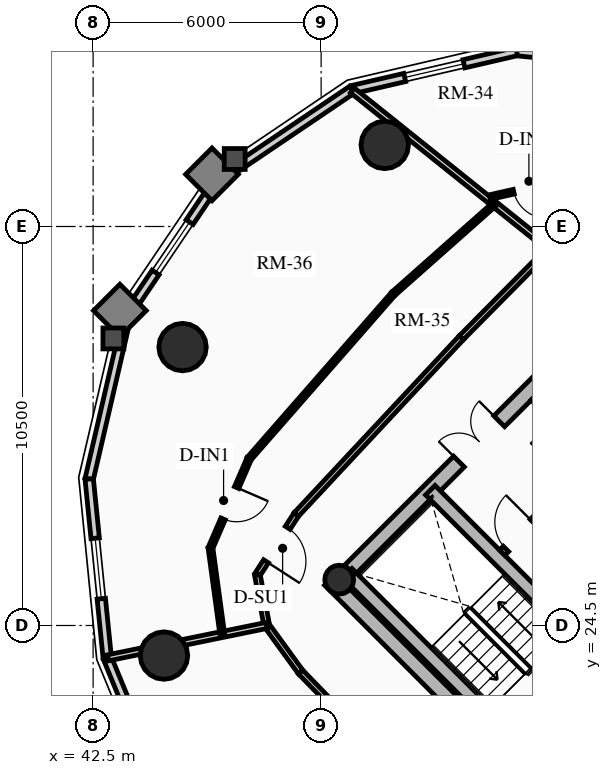
"""IFC4 building model, lengths in metres.
Left out: names, types, materials, properties, quantities, classifications, styles, units other than length and angle.
Written with IfcOpenShell. Run it as: python <this file> out.ifc"""

import sys

from ifc_helpers import new_model, si_unit, direction, frame, frame_2d, origin, origin_2d, place, context, subcontext, project, spatial, rectangle, circle, hollow_circle, extrude, source, transform, mapped, element, fill, save


model = new_model("IFC4")
c1 = context("Model", 3, precision=1e-05, world=origin(), true_north=direction((0.0, 1.0)))
c2 = subcontext(c1, "Body", "Model", "MODEL_VIEW")
j1 = project(units=[si_unit("LENGTHUNIT", "METRE"), si_unit("PLANEANGLEUNIT", "RADIAN")], contexts=[c1])
p1 = place(None, origin())
s1 = spatial("IfcSite", under=j1, at=p1, CompositionType="ELEMENT")
p2 = place(p1, origin())
s2 = spatial("IfcBuilding", under=s1, at=p2, CompositionType="ELEMENT")
p3 = place(p2, frame((0.0, 0.0, 169.06)))
s3 = spatial("IfcBuildingStorey", under=s2, at=p3, CompositionType="ELEMENT", Elevation=169.06)
p4 = place(p3, frame((58.702, 15.732, 0.0), z_axis=(0.0, 0.0, 1.0), x_axis=(-0.707106781187, 0.707106781187, 0.0)))
e1 = element("IfcWall", 1, at=p4, inside=s3, PredefinedType="SHEAR", context=c2, shape_type="SweptSolid", body=[
    extrude(rectangle(XDim=14.1, YDim=0.4, at=frame_2d((7.05, 0.0))), origin(), (0.0, 0.0, 1.0), 2.91),
])
p5 = place(p3, frame((48.873, 25.561, 0.0), z_axis=(0.0, 0.0, 1.0), x_axis=(0.707106781187, 0.707106781187, 0.0)))
e2 = element("IfcWall", 2, at=p5, inside=s3, PredefinedType="SHEAR", context=c2, shape_type="SweptSolid", body=[
    extrude(rectangle(XDim=10.7, YDim=0.4, at=frame_2d((5.35, 0.0))), origin(), (0.0, 0.0, 1.0), 2.91),
])
m1 = source(origin(), c2, "Body", "SweptSolid", [
    extrude(rectangle(XDim=1.5, YDim=2.02, at=frame_2d((0.75, 1.01))), frame((0.0, 0.21, 0.0), z_axis=(0.0, -1.0, 0.0), x_axis=(1.0, 0.0, 0.0)), (0.0, 0.0, 1.0), 0.42),
])
p6 = place(p5, frame((4.6, 0.0, 0.0)))
e3 = element("IfcOpeningElement", 3, at=p6, cuts=e2, PredefinedType="OPENING", context=c2, shape_type="MappedRepresentation", body=[
    mapped(m1, transform((0.0, 0.0, 0.0), x_axis=(1.0, 0.0, 0.0), y_axis=(0.0, 1.0, 0.0), z_axis=(0.0, 0.0, 1.0), scale=1.0)),
])
p7 = place(p3, frame((61.06, 18.373, 0.0), z_axis=(0.0, 0.0, 1.0), x_axis=(-0.707106781187, 0.707106781187, 0.0)))
e4 = element("IfcWall", 4, at=p7, inside=s3, PredefinedType="SHEAR", context=c2, shape_type="SweptSolid", body=[
    extrude(rectangle(XDim=13.7, YDim=0.35, at=frame_2d((6.85, 0.0))), origin(), (0.0, 0.0, 1.0), 2.91),
])
m2 = source(origin(), c2, "Body", "SweptSolid", [
    extrude(rectangle(XDim=1.1, YDim=2.015, at=frame_2d((0.55, 1.007))), frame((0.0, 0.185, 0.0), z_axis=(0.0, -1.0, 0.0), x_axis=(1.0, 0.0, 0.0)), (0.0, 0.0, 1.0), 0.37),
])
p8 = place(p7, frame((4.85, 0.0, 0.0)))
e5 = element("IfcOpeningElement", 5, at=p8, cuts=e4, PredefinedType="OPENING", context=c2, shape_type="MappedRepresentation", body=[
    mapped(m2, transform((0.0, 0.0, 0.0), x_axis=(1.0, 0.0, 0.0), y_axis=(0.0, 1.0, 0.0), z_axis=(0.0, 0.0, 1.0), scale=1.0)),
])
p9 = place(p7, frame((0.625, 0.0, 0.0)))
e6 = element("IfcOpeningElement", 6, at=p9, cuts=e4, PredefinedType="OPENING", context=c2, shape_type="MappedRepresentation", body=[
    mapped(m2, transform((0.0, 0.0, 0.0), x_axis=(1.0, 0.0, 0.0), y_axis=(0.0, 1.0, 0.0), z_axis=(0.0, 0.0, 1.0), scale=1.0)),
])
p10 = place(p7, frame((2.625, 0.0, 0.0)))
e7 = element("IfcOpeningElement", 7, at=p10, cuts=e4, PredefinedType="OPENING", context=c2, shape_type="MappedRepresentation", body=[
    mapped(m2, transform((0.0, 0.0, 0.0), x_axis=(1.0, 0.0, 0.0), y_axis=(0.0, 1.0, 0.0), z_axis=(0.0, 0.0, 1.0), scale=1.0)),
])
m3 = source(origin(), c2, "Body", "SweptSolid", [
    extrude(rectangle(XDim=1.15, YDim=2.02, at=frame_2d((0.575, 1.01))), frame((0.0, 0.185, 0.0), z_axis=(0.0, -1.0, 0.0), x_axis=(1.0, 0.0, 0.0)), (0.0, 0.0, 1.0), 0.37),
])
p11 = place(p7, frame((7.27, 0.0, 0.0)))
e8 = element("IfcOpeningElement", 8, at=p11, cuts=e4, PredefinedType="OPENING", context=c2, shape_type="MappedRepresentation", body=[
    mapped(m3, transform((0.0, 0.0, 0.0), x_axis=(1.0, 0.0, 0.0), y_axis=(0.0, 1.0, 0.0), z_axis=(0.0, 0.0, 1.0), scale=1.0)),
])
p12 = place(p3, frame((53.922, 21.141, 0.0), z_axis=(0.0, 0.0, 1.0), x_axis=(-0.707106781187, 0.707106781187, 0.0)))
e9 = element("IfcWall", 9, at=p12, inside=s3, PredefinedType="SHEAR", context=c2, shape_type="SweptSolid", body=[
    extrude(rectangle(XDim=6.695, YDim=0.35, at=frame_2d((3.348, 0.0))), origin(), (0.0, 0.0, 1.0), 2.91),
])
p13 = place(p3, frame((53.784, 21.003, 0.0), z_axis=(0.0, 0.0, 1.0), x_axis=(0.707106781187, 0.707106781187, 0.0)))
e10 = element("IfcWall", 10, at=p13, inside=s3, PredefinedType="SHEAR", context=c2, shape_type="SweptSolid", body=[
    extrude(rectangle(XDim=3.285, YDim=0.35, at=frame_2d((1.643, 0.0))), origin(), (0.0, 0.0, 1.0), 2.91),
])
p14 = place(p3, frame((48.976, 25.706, 0.0), z_axis=(0.0, 0.0, 1.0), x_axis=(0.707106781187, 0.707106781187, 0.0)))
e11 = element("IfcColumn", 11, at=p14, inside=s3, PredefinedType="COLUMN", context=c2, shape_type="SweptSolid", body=[
    extrude(hollow_circle(Radius=0.38, WallThickness=0.032, at=origin_2d()), origin(), (0.0, 0.0, 1.0), 2.91),
])
for number, where, z_axis, x_axis in (
    (12, (50.173, 37.146, 0.0), (0.0, 0.0, 1.0), (1.0, 0.0, 0.0)),
    (13, (44.854, 31.827, 0.0), (0.0, 0.0, 1.0), (1.0, 0.0, 0.0)),
    (14, (44.365, 23.709, 0.0), (0.0, 0.0, 1.0), (1.0, 0.0, 0.0)),
):
    element("IfcColumn", number, at=place(p3, frame(where, z_axis=z_axis, x_axis=x_axis)), inside=s3, PredefinedType="USERDEFINED", context=c2, shape_type="SweptSolid", body=[
        extrude(circle(Radius=0.625, at=origin_2d()), origin(), (0.0, 0.0, 1.0), 2.91),
    ])
p15 = place(p3, frame((53.645, 39.603, 0.0), z_axis=(0.0, 0.0, 1.0), x_axis=(0.994943283129, -0.100438356004, 0.0)))
e15 = element("IfcWall", 15, at=p15, inside=s3, PredefinedType="SOLIDWALL", context=c2, shape_type="SweptSolid", body=[
    extrude(rectangle(XDim=4.733, YDim=0.22, at=frame_2d((2.366, 0.0))), origin(), (0.0, 0.0, 1.0), 2.245),
])
m4 = source(origin(), c2, "Body", "SweptSolid", [
    extrude(rectangle(XDim=1.15, YDim=2.005, at=frame_2d((0.575, 1.002))), frame((0.0, 0.12, 0.0), z_axis=(0.0, -1.0, 0.0), x_axis=(1.0, 0.0, 0.0)), (0.0, 0.0, 1.0), 0.24),
])
p16 = place(p15, frame((1.791, 0.0, 0.0)))
e16 = element("IfcOpeningElement", 16, at=p16, cuts=e15, PredefinedType="OPENING", context=c2, shape_type="MappedRepresentation", body=[
    mapped(m4, transform((0.0, 0.0, 0.0), x_axis=(1.0, 0.0, 0.0), y_axis=(0.0, 1.0, 0.0), z_axis=(0.0, 0.0, 1.0), scale=1.0)),
])
p17 = place(p3, frame((49.313, 38.6, 0.0), z_axis=(0.0, 0.0, 1.0), x_axis=(0.97422620202, 0.22557328587, 0.0)))
e17 = element("IfcWall", 17, at=p17, inside=s3, PredefinedType="SOLIDWALL", context=c2, shape_type="SweptSolid", body=[
    extrude(rectangle(XDim=4.446, YDim=0.22, at=frame_2d((2.223, 0.0))), origin(), (0.0, 0.0, 1.0), 2.245),
])
m5 = source(origin(), c2, "Body", "SweptSolid", [
    extrude(rectangle(XDim=1.6, YDim=1.3, at=frame_2d((0.8, 0.65))), frame((0.0, 0.12, 0.0), z_axis=(0.0, -1.0, 0.0), x_axis=(1.0, 0.0, 0.0)), (0.0, 0.0, 1.0), 0.24),
])
p18 = place(p17, frame((1.423, 0.0, 0.65)))
e18 = element("IfcOpeningElement", 18, at=p18, cuts=e17, PredefinedType="OPENING", context=c2, shape_type="MappedRepresentation", body=[
    mapped(m5, transform((0.0, 0.0, 0.0), x_axis=(1.0, 0.0, 0.0), y_axis=(0.0, 1.0, 0.0), z_axis=(0.0, 0.0, 1.0), scale=1.0)),
])
p19 = place(p3, frame((45.783, 36.217, 0.0), z_axis=(0.0, 0.0, 1.0), x_axis=(0.828817439852, 0.55951912514, 0.0)))
e19 = element("IfcWall", 19, at=p19, inside=s3, PredefinedType="SOLIDWALL", context=c2, shape_type="SweptSolid", body=[
    extrude(rectangle(XDim=4.259, YDim=0.22, at=frame_2d((2.129, 0.0))), origin(), (0.0, 0.0, 1.0), 2.245),
])
p20 = place(p3, frame((43.4, 32.687, 0.0), z_axis=(0.0, 0.0, 1.0), x_axis=(0.55951912514, 0.828817439852, 0.0)))
e20 = element("IfcWall", 20, at=p20, inside=s3, PredefinedType="SOLIDWALL", context=c2, shape_type="SweptSolid", body=[
    extrude(rectangle(XDim=4.259, YDim=0.22, at=frame_2d((2.129, 0.0))), origin(), (0.0, 0.0, 1.0), 2.245),
])
p21 = place(p20, frame((1.33, 0.0, 0.65)))
e21 = element("IfcOpeningElement", 21, at=p21, cuts=e20, PredefinedType="OPENING", context=c2, shape_type="MappedRepresentation", body=[
    mapped(m5, transform((0.0, 0.0, 0.0), x_axis=(1.0, 0.0, 0.0), y_axis=(0.0, 1.0, 0.0), z_axis=(0.0, 0.0, 1.0), scale=1.0)),
])
p22 = place(p3, frame((42.397, 28.355, 0.0), z_axis=(0.0, 0.0, 1.0), x_axis=(0.22557328587, 0.97422620202, 0.0)))
e22 = element("IfcWall", 22, at=p22, inside=s3, PredefinedType="SOLIDWALL", context=c2, shape_type="SweptSolid", body=[
    extrude(rectangle(XDim=4.446, YDim=0.22, at=frame_2d((2.223, 0.0))), origin(), (0.0, 0.0, 1.0), 2.245),
])
p23 = place(p3, frame((42.873, 23.646, 0.0), z_axis=(0.0, 0.0, 1.0), x_axis=(-0.100438356004, 0.994943283129, 0.0)))
e23 = element("IfcWall", 23, at=p23, inside=s3, PredefinedType="SOLIDWALL", context=c2, shape_type="SweptSolid", body=[
    extrude(rectangle(XDim=4.733, YDim=0.22, at=frame_2d((2.366, 0.0))), origin(), (0.0, 0.0, 1.0), 2.245),
])
p24 = place(p23, frame((1.566, 0.0, 0.65)))
e24 = element("IfcOpeningElement", 24, at=p24, cuts=e23, PredefinedType="OPENING", context=c2, shape_type="MappedRepresentation", body=[
    mapped(m5, transform((0.0, 0.0, 0.0), x_axis=(1.0, 0.0, 0.0), y_axis=(0.0, 1.0, 0.0), z_axis=(0.0, 0.0, 1.0), scale=1.0)),
])
p25 = place(p3, frame((44.78, 19.021, 0.0), z_axis=(0.0, 0.0, 1.0), x_axis=(-0.381196434348, 0.924494066201, 0.0)))
e25 = element("IfcWall", 25, at=p25, inside=s3, PredefinedType="SOLIDWALL", context=c2, shape_type="SweptSolid", body=[
    extrude(rectangle(XDim=5.003, YDim=0.22, at=frame_2d((2.501, 0.0))), origin(), (0.0, 0.0, 1.0), 2.245),
])
p26 = place(p25, frame((1.702, 0.0, 0.65)))
e26 = element("IfcOpeningElement", 26, at=p26, cuts=e25, PredefinedType="OPENING", context=c2, shape_type="MappedRepresentation", body=[
    mapped(m5, transform((0.0, 0.0, 0.0), x_axis=(1.0, 0.0, 0.0), y_axis=(0.0, 1.0, 0.0), z_axis=(0.0, 0.0, 1.0), scale=1.0)),
])
p27 = place(p3, frame((53.264, 26.416, 0.0), z_axis=(0.0, 0.0, 1.0), x_axis=(0.707106781187, 0.707106781187, 0.0)))
e27 = element("IfcWall", 27, at=p27, inside=s3, PredefinedType="PARTITIONING", context=c2, shape_type="SweptSolid", body=[
    extrude(rectangle(XDim=3.28, YDim=0.2, at=frame_2d((1.64, 0.0))), origin(), (0.0, 0.0, 1.0), 2.675),
])
m6 = source(origin(), c2, "Body", "SweptSolid", [
    extrude(rectangle(XDim=1.0, YDim=2.015, at=frame_2d((0.5, 1.007))), frame((0.0, 0.11, 0.0), z_axis=(0.0, -1.0, 0.0), x_axis=(1.0, 0.0, 0.0)), (0.0, 0.0, 1.0), 0.22),
])
p28 = place(p27, frame((0.14, 0.0, 0.0)))
e28 = element("IfcOpeningElement", 28, at=p28, cuts=e27, PredefinedType="OPENING", context=c2, shape_type="MappedRepresentation", body=[
    mapped(m6, transform((0.0, 0.0, 0.0), x_axis=(1.0, 0.0, 0.0), y_axis=(0.0, 1.0, 0.0), z_axis=(0.0, 0.0, 1.0), scale=1.0)),
])
m7 = source(origin(), c2, "Body", "SweptSolid", [
    extrude(rectangle(XDim=0.9, YDim=2.005, at=frame_2d((0.45, 1.002))), frame((0.0, 0.11, 0.0), z_axis=(0.0, -1.0, 0.0), x_axis=(1.0, 0.0, 0.0)), (0.0, 0.0, 1.0), 0.22),
])
p29 = place(p27, frame((2.05, 0.0, 0.0)))
e29 = element("IfcOpeningElement", 29, at=p29, cuts=e27, PredefinedType="OPENING", context=c2, shape_type="MappedRepresentation", body=[
    mapped(m7, transform((0.0, 0.0, 0.0), x_axis=(1.0, 0.0, 0.0), y_axis=(0.0, 1.0, 0.0), z_axis=(0.0, 0.0, 1.0), scale=1.0)),
])
p30 = place(p3, frame((56.839, 27.728, 0.0), z_axis=(0.0, 0.0, 1.0), x_axis=(-0.707106781187, 0.707106781187, 0.0)))
e30 = element("IfcWall", 30, at=p30, inside=s3, PredefinedType="PARTITIONING", context=c2, shape_type="SweptSolid", body=[
    extrude(rectangle(XDim=3.9, YDim=0.16, at=frame_2d((1.95, 0.0))), origin(), (0.0, 0.0, 1.0), 2.675),
])
m8 = source(origin(), c2, "Body", "SweptSolid", [
    extrude(rectangle(XDim=0.9, YDim=2.005, at=frame_2d((0.45, 1.002))), frame((0.0, 0.09, 0.0), z_axis=(0.0, -1.0, 0.0), x_axis=(1.0, 0.0, 0.0)), (0.0, 0.0, 1.0), 0.18),
])
p31 = place(p30, frame((2.2, 0.0, 0.0)))
e31 = element("IfcOpeningElement", 31, at=p31, cuts=e30, PredefinedType="OPENING", context=c2, shape_type="MappedRepresentation", body=[
    mapped(m8, transform((0.0, 0.0, 0.0), x_axis=(1.0, 0.0, 0.0), y_axis=(0.0, 1.0, 0.0), z_axis=(0.0, 0.0, 1.0), scale=1.0)),
])
p32 = place(p3, frame((54.514, 34.422, 0.0), z_axis=(0.0, 0.0, 1.0), x_axis=(-0.703289573518, -0.710903492593, 0.0)))
e32 = element("IfcWall", 32, at=p32, inside=s3, PredefinedType="PARTITIONING", context=c2, shape_type="SweptSolid", body=[
    extrude(rectangle(XDim=3.303, YDim=0.15, at=frame_2d((1.651, 0.0))), origin(), (0.0, 0.0, 1.0), 2.245),
])
p33 = place(p3, frame((52.191, 32.074, 0.0), z_axis=(0.0, 0.0, 1.0), x_axis=(-0.682404362608, -0.730974887321, 0.0)))
e33 = element("IfcWall", 33, at=p33, inside=s3, PredefinedType="PARTITIONING", context=c2, shape_type="SweptSolid", body=[
    extrude(rectangle(XDim=6.364, YDim=0.15, at=frame_2d((3.182, 0.0))), origin(), (0.0, 0.0, 1.0), 2.245),
])
p34 = place(p3, frame((47.849, 27.423, 0.0), z_axis=(0.0, 0.0, 1.0), x_axis=(-0.543529808582, -0.839389866023, 0.0)))
e34 = element("IfcWall", 34, at=p34, inside=s3, PredefinedType="PARTITIONING", context=c2, shape_type="SweptSolid", body=[
    extrude(rectangle(XDim=1.89, YDim=0.15, at=frame_2d((0.945, 0.0))), origin(), (0.0, 0.0, 1.0), 2.245),
])
m9 = source(origin(), c2, "Body", "SweptSolid", [
    extrude(rectangle(XDim=1.05, YDim=2.015, at=frame_2d((0.525, 1.007))), frame((0.0, 0.085, 0.0), z_axis=(0.0, -1.0, 0.0), x_axis=(1.0, 0.0, 0.0)), (0.0, 0.0, 1.0), 0.17),
])
p35 = place(p34, frame((0.42, 0.0, 0.0)))
e35 = element("IfcOpeningElement", 35, at=p35, cuts=e34, PredefinedType="OPENING", context=c2, shape_type="MappedRepresentation", body=[
    mapped(m9, transform((0.0, 0.0, 0.0), x_axis=(1.0, 0.0, 0.0), y_axis=(0.0, 1.0, 0.0), z_axis=(0.0, 0.0, 1.0), scale=1.0)),
])
p36 = place(p3, frame((46.822, 25.836, 0.0), z_axis=(0.0, 0.0, 1.0), x_axis=(0.182115036249, -0.983277231289, 0.0)))
e36 = element("IfcWall", 36, at=p36, inside=s3, PredefinedType="PARTITIONING", context=c2, shape_type="SweptSolid", body=[
    extrude(rectangle(XDim=1.357, YDim=0.15, at=frame_2d((0.678, 0.0))), origin(), (0.0, 0.0, 1.0), 2.245),
])
p37 = place(p3, frame((47.069, 24.502, 0.0), z_axis=(0.0, 0.0, 1.0), x_axis=(0.587577436866, -0.809167940347, 0.0)))
e37 = element("IfcWall", 37, at=p37, inside=s3, PredefinedType="PARTITIONING", context=c2, shape_type="SweptSolid", body=[
    extrude(rectangle(XDim=1.515, YDim=0.15, at=frame_2d((0.757, 0.0))), origin(), (0.0, 0.0, 1.0), 2.245),
])
p38 = place(p3, frame((47.959, 23.277, 0.0), z_axis=(0.0, 0.0, 1.0), x_axis=(0.696422573496, -0.717631938479, 0.0)))
e38 = element("IfcWall", 38, at=p38, inside=s3, PredefinedType="PARTITIONING", context=c2, shape_type="SweptSolid", body=[
    extrude(rectangle(XDim=5.882, YDim=0.15, at=frame_2d((2.941, 0.0))), origin(), (0.0, 0.0, 1.0), 2.675),
])
m10 = source(origin(), c2, "Body", "SweptSolid", [
    extrude(rectangle(XDim=1.0, YDim=2.015, at=frame_2d((0.5, 1.007))), frame((0.0, 0.085, 0.0), z_axis=(0.0, -1.0, 0.0), x_axis=(1.0, 0.0, 0.0)), (0.0, 0.0, 1.0), 0.17),
])
p39 = place(p38, frame((2.441, 0.0, 0.0)))
e39 = element("IfcOpeningElement", 39, at=p39, cuts=e38, PredefinedType="OPENING", context=c2, shape_type="MappedRepresentation", body=[
    mapped(m10, transform((0.0, 0.0, 0.0), x_axis=(1.0, 0.0, 0.0), y_axis=(0.0, 1.0, 0.0), z_axis=(0.0, 0.0, 1.0), scale=1.0)),
])
p40 = place(p3, frame((54.514, 34.422, 0.0), z_axis=(0.0, 0.0, 1.0), x_axis=(-0.780385234796, 0.625299036712, 0.0)))
e40 = element("IfcWall", 40, at=p40, inside=s3, PredefinedType="PARTITIONING", context=c2, shape_type="SweptSolid", body=[
    extrude(rectangle(XDim=6.653, YDim=0.16, at=frame_2d((3.326, 0.0))), origin(), (0.0, 0.0, 1.0), 2.245),
])
p41 = place(p3, frame((47.069, 24.502, 0.0), z_axis=(0.0, 0.0, 1.0), x_axis=(-0.979772902724, -0.200112616012, 0.0)))
e41 = element("IfcWall", 41, at=p41, inside=s3, PredefinedType="PARTITIONING", context=c2, shape_type="SweptSolid", body=[
    extrude(rectangle(XDim=4.263, YDim=0.16, at=frame_2d((2.131, 0.0))), origin(), (0.0, 0.0, 1.0), 2.245),
])
p42 = place(p3, frame((54.871, 36.211, 0.0), z_axis=(0.0, 0.0, 1.0), x_axis=(-0.975212623293, -0.221269833846, 0.0)))
e42 = element("IfcWall", 42, at=p42, inside=s3, PredefinedType="PARTITIONING", context=c2, shape_type="SweptSolid", body=[
    extrude(rectangle(XDim=1.983, YDim=0.125, at=frame_2d((0.991, 0.0))), origin(), (0.0, 0.0, 1.0), 2.312),
])
m11 = source(origin(), c2, "Body", "SweptSolid", [
    extrude(rectangle(XDim=0.9, YDim=2.005, at=frame_2d((0.45, 1.002))), frame((0.0, 0.073, 0.0), z_axis=(0.0, -1.0, 0.0), x_axis=(1.0, 0.0, 0.0)), (0.0, 0.0, 1.0), 0.145),
])
p43 = place(p42, frame((0.436, 0.0, 0.0)))
e43 = element("IfcOpeningElement", 43, at=p43, cuts=e42, PredefinedType="OPENING", context=c2, shape_type="MappedRepresentation", body=[
    mapped(m11, transform((0.0, 0.0, 0.0), x_axis=(1.0, 0.0, 0.0), y_axis=(0.0, 1.0, 0.0), z_axis=(0.0, 0.0, 1.0), scale=1.0)),
])
p44 = place(p3, frame((53.06, 35.587, 0.0), z_axis=(0.0, 0.0, 1.0), x_axis=(-0.748390346028, -0.663258539314, 0.0)))
e44 = element("IfcWall", 44, at=p44, inside=s3, PredefinedType="PARTITIONING", context=c2, shape_type="SweptSolid", body=[
    extrude(rectangle(XDim=3.553, YDim=0.125, at=frame_2d((1.777, 0.0))), origin(), (0.0, 0.0, 1.0), 2.245),
])
p45 = place(p3, frame((50.401, 33.23, 0.0), z_axis=(0.0, 0.0, 1.0), x_axis=(-0.658387591096, -0.752679068322, 0.0)))
e45 = element("IfcWall", 45, at=p45, inside=s3, PredefinedType="PARTITIONING", context=c2, shape_type="SweptSolid", body=[
    extrude(rectangle(XDim=5.761, YDim=0.125, at=frame_2d((2.88, 0.0))), origin(), (0.0, 0.0, 1.0), 2.245),
])
p46 = place(p3, frame((46.608, 28.894, 0.0), z_axis=(0.0, 0.0, 1.0), x_axis=(-0.397650183672, -0.917537100844, 0.0)))
e46 = element("IfcWall", 46, at=p46, inside=s3, PredefinedType="PARTITIONING", context=c2, shape_type="SweptSolid", body=[
    extrude(rectangle(XDim=2.564, YDim=0.125, at=frame_2d((1.282, 0.0))), origin(), (0.0, 0.0, 1.0), 2.245),
])
p47 = place(p46, frame((0.832, 0.0, 0.0)))
e47 = element("IfcOpeningElement", 47, at=p47, cuts=e46, PredefinedType="OPENING", context=c2, shape_type="MappedRepresentation", body=[
    mapped(m11, transform((0.0, 0.0, 0.0), x_axis=(1.0, 0.0, 0.0), y_axis=(0.0, 1.0, 0.0), z_axis=(0.0, 0.0, 1.0), scale=1.0)),
])
p48 = place(p3, frame((45.588, 26.541, 0.0), z_axis=(0.0, 0.0, 1.0), x_axis=(0.135321759641, -0.990801706381, 0.0)))
e48 = element("IfcWall", 48, at=p48, inside=s3, PredefinedType="PARTITIONING", context=c2, shape_type="SweptSolid", body=[
    extrude(rectangle(XDim=2.299, YDim=0.125, at=frame_2d((1.149, 0.0))), origin(), (0.0, 0.0, 1.0), 2.245),
])
m12 = source(origin(), c2, "Body", "SweptSolid", [
    extrude(rectangle(XDim=1.6, YDim=1.3, at=frame_2d((0.8, 0.65))), frame((0.0, 0.03, 0.0), z_axis=(0.0, -1.0, 0.0), x_axis=(1.0, 0.0, 0.0)), (0.0, 0.0, 1.0), 0.06),
])
p49 = place(p18, origin())
e49 = element("IfcWindow", 49, at=p49, inside=s3, PartitioningType="SINGLE_PANEL", PredefinedType="WINDOW", context=c2, shape_type="MappedRepresentation", body=[
    mapped(m12, transform((0.0, 0.0, 0.0), x_axis=(1.0, 0.0, 0.0), y_axis=(0.0, 1.0, 0.0), z_axis=(0.0, 0.0, 1.0), scale=1.0)),
])
fill(e18, e49)
p50 = place(p21, origin())
e50 = element("IfcWindow", 50, at=p50, inside=s3, PartitioningType="SINGLE_PANEL", PredefinedType="WINDOW", context=c2, shape_type="MappedRepresentation", body=[
    mapped(m12, transform((0.0, 0.0, 0.0), x_axis=(1.0, 0.0, 0.0), y_axis=(0.0, 1.0, 0.0), z_axis=(0.0, 0.0, 1.0), scale=1.0)),
])
fill(e21, e50)
p51 = place(p24, origin())
e51 = element("IfcWindow", 51, at=p51, inside=s3, PartitioningType="SINGLE_PANEL", PredefinedType="WINDOW", context=c2, shape_type="MappedRepresentation", body=[
    mapped(m12, transform((0.0, 0.0, 0.0), x_axis=(1.0, 0.0, 0.0), y_axis=(0.0, 1.0, 0.0), z_axis=(0.0, 0.0, 1.0), scale=1.0)),
])
fill(e24, e51)
m13 = source(origin(), c2, "Body", "SweptSolid", [
    extrude(rectangle(XDim=1.5, YDim=2.02, at=frame_2d((0.75, 1.01))), frame((0.0, 0.025, 0.0), z_axis=(0.0, -1.0, 0.0), x_axis=(1.0, 0.0, 0.0)), (0.0, 0.0, 1.0), 0.05),
])
p52 = place(p6, origin())
e52 = element("IfcDoor", 52, at=p52, inside=s3, OperationType="DOUBLE_DOOR_SINGLE_SWING", PredefinedType="DOOR", context=c2, shape_type="MappedRepresentation", body=[
    mapped(m13, transform((0.0, 0.0, 0.0), x_axis=(1.0, 0.0, 0.0), y_axis=(0.0, 1.0, 0.0), z_axis=(0.0, 0.0, 1.0), scale=1.0)),
])
fill(e3, e52)
m14 = source(origin(), c2, "Body", "SweptSolid", [
    extrude(rectangle(XDim=1.0, YDim=2.015, at=frame_2d((0.5, 1.007))), frame((0.0, 0.025, 0.0), z_axis=(0.0, -1.0, 0.0), x_axis=(1.0, 0.0, 0.0)), (0.0, 0.0, 1.0), 0.05),
])
p53 = place(p28, origin())
e53 = element("IfcDoor", 53, at=p53, inside=s3, OperationType="SINGLE_SWING_RIGHT", PredefinedType="DOOR", context=c2, shape_type="MappedRepresentation", body=[
    mapped(m14, transform((0.0, 0.0, 0.0), x_axis=(1.0, 0.0, 0.0), y_axis=(0.0, 1.0, 0.0), z_axis=(0.0, 0.0, 1.0), scale=1.0)),
])
fill(e28, e53)
m15 = source(origin(), c2, "Body", "SweptSolid", [
    extrude(rectangle(XDim=0.9, YDim=2.005, at=frame_2d((0.45, 1.002))), frame((0.0, 0.025, 0.0), z_axis=(0.0, -1.0, 0.0), x_axis=(1.0, 0.0, 0.0)), (0.0, 0.0, 1.0), 0.05),
])
p54 = place(p43, origin())
e54 = element("IfcDoor", 54, at=p54, inside=s3, OperationType="SINGLE_SWING_LEFT", PredefinedType="DOOR", context=c2, shape_type="MappedRepresentation", body=[
    mapped(m15, transform((0.0, 0.0, 0.0), x_axis=(1.0, 0.0, 0.0), y_axis=(0.0, 1.0, 0.0), z_axis=(0.0, 0.0, 1.0), scale=1.0)),
])
fill(e43, e54)
m16 = source(origin(), c2, "Body", "SweptSolid", [
    extrude(rectangle(XDim=1.05, YDim=2.015, at=frame_2d((0.525, 1.007))), frame((0.0, 0.025, 0.0), z_axis=(0.0, -1.0, 0.0), x_axis=(1.0, 0.0, 0.0)), (0.0, 0.0, 1.0), 0.05),
])
p55 = place(p35, origin())
e55 = element("IfcDoor", 55, at=p55, inside=s3, OperationType="SINGLE_SWING_RIGHT", PredefinedType="DOOR", context=c2, shape_type="MappedRepresentation", body=[
    mapped(m16, transform((0.0, 0.0, 0.0), x_axis=(1.0, 0.0, 0.0), y_axis=(0.0, 1.0, 0.0), z_axis=(0.0, 0.0, 1.0), scale=1.0)),
])
fill(e35, e55)
p56 = place(p47, origin())
e56 = element("IfcDoor", 56, at=p56, inside=s3, OperationType="SINGLE_SWING_LEFT", PredefinedType="DOOR", context=c2, shape_type="MappedRepresentation", body=[
    mapped(m15, transform((0.0, 0.0, 0.0), x_axis=(1.0, 0.0, 0.0), y_axis=(0.0, 1.0, 0.0), z_axis=(0.0, 0.0, 1.0), scale=1.0)),
])
fill(e47, e56)
save(model, sys.argv[1])
